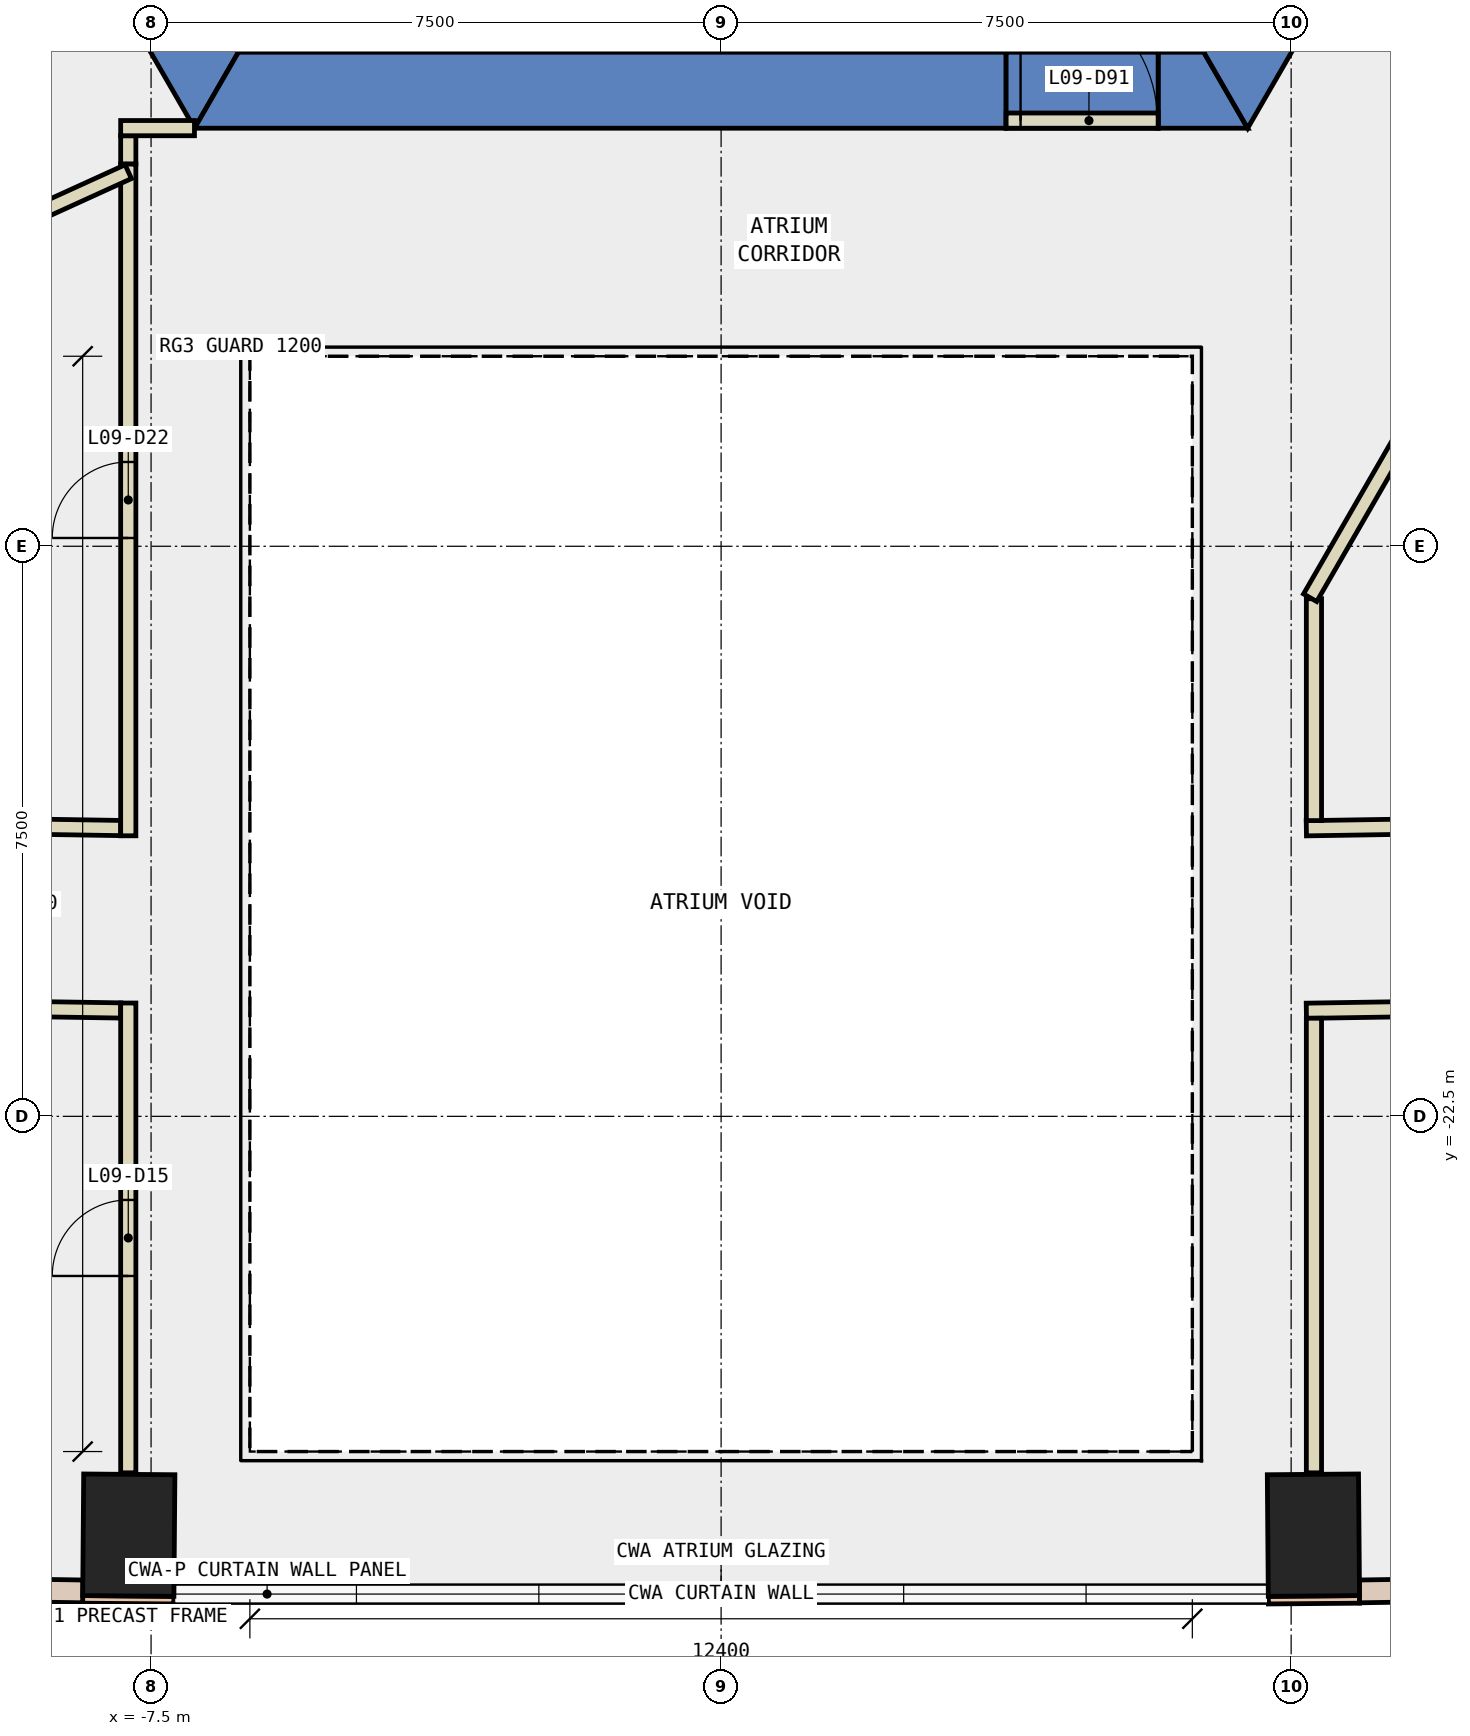
"""IFC4 building model, lengths in metres.
Left out: names, types, materials, properties, quantities, classifications, styles, units other than length and angle.
Written with IfcOpenShell. Run it as: python <this file> out.ifc"""

import sys

from ifc_helpers import new_model, si_unit, direction, frame, frame_2d, origin, origin_2d, place, context, subcontext, project, spatial, polyline, rectangle, outline, extrude, element, fill, save


model = new_model("IFC4")
c1 = context("Model", 3, precision=1e-05, world=origin(), true_north=direction((0.0, 1.0)))
c2 = subcontext(c1, "Body", "Model", "MODEL_VIEW")
j1 = project(units=[si_unit("LENGTHUNIT", "METRE"), si_unit("PLANEANGLEUNIT", "RADIAN")], contexts=[c1])
p1 = place(None, origin())
s1 = spatial("IfcSite", under=j1, at=p1, CompositionType="ELEMENT")
p2 = place(p1, origin())
s2 = spatial("IfcBuilding", under=s1, at=p2, CompositionType="ELEMENT")
p3 = place(p2, frame((0.0, 0.0, 47.6)))
s3 = spatial("IfcBuildingStorey", under=s2, at=p3, CompositionType="ELEMENT", Elevation=47.6)
for number, where, z_axis, x_axis in (
    (1, (-7.793, -28.01, -0.4), (0.0, 0.0, 1.0), (-1.0, 0.008, 0.0)),
    (2, (7.793, -28.01, -0.4), (0.0, 0.0, 1.0), (1.0, 0.008, 0.0)),
):
    element("IfcColumn", number, at=place(p3, frame(where, z_axis=z_axis, x_axis=x_axis)), inside=s3, PredefinedType="COLUMN", context=c2, shape_type="SweptSolid", body=[
        extrude(rectangle(XDim=1.2, YDim=1.6, at=origin_2d()), origin(), (0.0, 0.0, 1.0), 4.2),
    ])
p4 = place(p3, frame((0.0, 0.0, -0.4)))
e3 = element("IfcWall", 3, at=p4, inside=s3, PredefinedType="SHEAR", context=c2, shape_type="SweptSolid", body=[
    extrude(outline(polyline([(-13.856, 2.5), (-6.928, -9.5), (-6.351, -8.5), (-12.702, 2.5), (-13.856, 2.5)])), origin(), (0.0, 0.0, 1.0), 4.2),
])
p5 = place(p3, frame((0.0, 0.0, -0.4)))
e4 = element("IfcWall", 4, at=p5, inside=s3, PredefinedType="SHEAR", context=c2, shape_type="SweptSolid", body=[
    extrude(outline(polyline([(3.75, -9.5), (3.75, -8.5), (-6.351, -8.5), (-6.928, -9.5), (3.75, -9.5)])), origin(), (0.0, 0.0, 1.0), 4.2),
])
p6 = place(p3, frame((0.0, 0.0, -0.4)))
e5 = element("IfcWall", 5, at=p6, inside=s3, PredefinedType="SHEAR", context=c2, shape_type="SweptSolid", body=[
    extrude(outline(polyline([(5.75, -8.5), (5.75, -9.5), (6.928, -9.5), (6.351, -8.5), (5.75, -8.5)])), origin(), (0.0, 0.0, 1.0), 4.2),
])
p7 = place(p3, frame((0.0, 0.0, 3.6)))
e6 = element("IfcWall", 6, at=p7, inside=s3, PredefinedType="SHEAR", context=c2, shape_type="SweptSolid", body=[
    extrude(outline(polyline([(5.75, -9.5), (5.75, -8.5), (3.75, -8.5), (3.75, -9.5), (5.75, -9.5)])), origin(), (0.0, 0.0, 1.0), 0.2),
])
p8 = place(p3, frame((0.0, 0.0, -0.4)))
e7 = element("IfcWall", 7, at=p8, inside=s3, PredefinedType="SHEAR", context=c2, shape_type="SweptSolid", body=[
    extrude(outline(polyline([(8.117, -7.44), (7.252, -6.94), (6.351, -8.5), (6.928, -9.5), (8.117, -7.44)])), origin(), (0.0, 0.0, 1.0), 4.2),
])
for number, where, z_axis, x_axis in (
    (8, (-8.4, -28.855, 0.0), (0.0, 0.0, 1.0), (1.0, -0.008, 0.0)),
    (9, (7.2, -28.865, 0.0), (0.0, 0.0, 1.0), (1.0, 0.008, 0.0)),
):
    element("IfcWall", number, at=place(p3, frame(where, z_axis=z_axis, x_axis=x_axis)), inside=s3, PredefinedType="STANDARD", context=c2, shape_type="SweptSolid", body=[
        extrude(rectangle(XDim=1.2, YDim=0.1, at=frame_2d((0.6, 0.0))), origin(), (0.0, 0.0, 1.0), 3.8),
    ])
p9 = place(p3, frame((-15.568, -28.637, 0.0), z_axis=(0.0, 0.0, 1.0), x_axis=(0.999875756772, -0.015762963512, 0.0)))
e10 = element("IfcWall", 10, at=p9, inside=s3, PredefinedType="STANDARD", context=c2, shape_type="SweptSolid", body=[
    extrude(rectangle(XDim=7.171, YDim=0.3, at=frame_2d((3.585, 0.0))), origin(), (0.0, 0.0, 1.0), 3.8),
])
p10 = place(p9, frame((0.593, 0.0, 0.9)))
e11 = element("IfcOpeningElement", 11, at=p10, cuts=e10, PredefinedType="OPENING", context=c2, shape_type="SweptSolid", body=[
    extrude(rectangle(XDim=2.4, YDim=2.6, at=frame_2d((1.2, 1.3))), frame((0.0, 0.16, 0.0), z_axis=(0.0, -1.0, 0.0), x_axis=(1.0, 0.0, 0.0)), (0.0, 0.0, 1.0), 0.32),
])
p11 = place(p9, frame((4.178, 0.0, 0.9)))
e12 = element("IfcOpeningElement", 12, at=p11, cuts=e10, PredefinedType="OPENING", context=c2, shape_type="SweptSolid", body=[
    extrude(rectangle(XDim=2.4, YDim=2.6, at=frame_2d((1.2, 1.3))), frame((0.0, 0.16, 0.0), z_axis=(0.0, -1.0, 0.0), x_axis=(1.0, 0.0, 0.0)), (0.0, 0.0, 1.0), 0.32),
])
p12 = place(p3, frame((8.398, -28.75, 0.0), z_axis=(0.0, 0.0, 1.0), x_axis=(0.999875756772, 0.015762963512, 0.0)))
e13 = element("IfcWall", 13, at=p12, inside=s3, PredefinedType="STANDARD", context=c2, shape_type="SweptSolid", body=[
    extrude(rectangle(XDim=7.171, YDim=0.3, at=frame_2d((3.585, 0.0))), origin(), (0.0, 0.0, 1.0), 3.8),
])
p13 = place(p12, frame((0.593, 0.0, 0.9)))
e14 = element("IfcOpeningElement", 14, at=p13, cuts=e13, PredefinedType="OPENING", context=c2, shape_type="SweptSolid", body=[
    extrude(rectangle(XDim=2.4, YDim=2.6, at=frame_2d((1.2, 1.3))), frame((0.0, 0.16, 0.0), z_axis=(0.0, -1.0, 0.0), x_axis=(1.0, 0.0, 0.0)), (0.0, 0.0, 1.0), 0.32),
])
p14 = place(p12, frame((4.178, 0.0, 0.9)))
e15 = element("IfcOpeningElement", 15, at=p14, cuts=e13, PredefinedType="OPENING", context=c2, shape_type="SweptSolid", body=[
    extrude(rectangle(XDim=2.4, YDim=2.6, at=frame_2d((1.2, 1.3))), frame((0.0, 0.16, 0.0), z_axis=(0.0, -1.0, 0.0), x_axis=(1.0, 0.0, 0.0)), (0.0, 0.0, 1.0), 0.32),
])
p15 = place(p3, frame((7.7, -18.71, 0.0), z_axis=(0.0, 0.0, 1.0), x_axis=(0.999874256061, 0.015857870791, 0.0)))
e16 = element("IfcWall", 16, at=p15, inside=s3, PredefinedType="PARTITIONING", context=c2, shape_type="SweptSolid", body=[
    extrude(rectangle(XDim=8.252, YDim=0.2, at=frame_2d((4.126, 0.0))), origin(), (0.0, 0.0, 1.0), 3.8),
])
p16 = place(p3, frame((-11.477, -18.65, 0.0), z_axis=(0.0, 0.0, 1.0), x_axis=(0.9998724957, -0.015968479661, 0.0)))
e17 = element("IfcWall", 17, at=p16, inside=s3, PredefinedType="PARTITIONING", context=c2, shape_type="SweptSolid", body=[
    extrude(rectangle(XDim=3.578, YDim=0.2, at=frame_2d((1.789, 0.0))), origin(), (0.0, 0.0, 1.0), 3.8),
])
p17 = place(p3, frame((16.078, -20.978, 0.0), z_axis=(0.0, 0.0, 1.0), x_axis=(-0.999873907997, -0.015879801838, 0.0)))
e18 = element("IfcWall", 18, at=p17, inside=s3, PredefinedType="PARTITIONING", context=c2, shape_type="SweptSolid", body=[
    extrude(rectangle(XDim=8.379, YDim=0.2, at=frame_2d((4.189, 0.0))), origin(), (0.0, 0.0, 1.0), 3.8),
])
p18 = place(p17, frame((3.689, 0.0, 0.0)))
e19 = element("IfcOpeningElement", 19, at=p18, cuts=e18, PredefinedType="OPENING", context=c2, shape_type="SweptSolid", body=[
    extrude(rectangle(XDim=1.0, YDim=2.1, at=frame_2d((0.5, 1.05))), frame((0.0, 0.11, 0.0), z_axis=(0.0, -1.0, 0.0), x_axis=(1.0, 0.0, 0.0)), (0.0, 0.0, 1.0), 0.22),
])
p19 = place(p3, frame((-7.9, -21.107, 0.0), z_axis=(0.0, 0.0, 1.0), x_axis=(-0.999876676102, 0.015704540367, 0.0)))
e20 = element("IfcWall", 20, at=p19, inside=s3, PredefinedType="PARTITIONING", context=c2, shape_type="SweptSolid", body=[
    extrude(rectangle(XDim=3.886, YDim=0.2, at=frame_2d((1.943, 0.0))), origin(), (0.0, 0.0, 1.0), 3.8),
])
p20 = place(p3, frame((7.8, -15.69, 0.0), z_axis=(0.0, 0.0, 1.0), x_axis=(0.0, -1.0, 0.0)))
e21 = element("IfcWall", 21, at=p20, inside=s3, PredefinedType="PARTITIONING", context=c2, shape_type="SweptSolid", body=[
    extrude(rectangle(XDim=2.919, YDim=0.2, at=frame_2d((1.459, 0.0))), origin(), (0.0, 0.0, 1.0), 3.8),
])
p21 = place(p3, frame((-7.8, -9.972, 0.0), z_axis=(0.0, 0.0, 1.0), x_axis=(0.0, 1.0, 0.0)))
e22 = element("IfcWall", 22, at=p21, inside=s3, PredefinedType="PARTITIONING", context=c2, shape_type="SweptSolid", body=[
    extrude(rectangle(XDim=0.373, YDim=0.2, at=frame_2d((0.187, 0.0))), origin(), (0.0, 0.0, 1.0), 3.8),
])
p22 = place(p3, frame((-7.9, -9.499, 0.0), z_axis=(0.0, 0.0, 1.0), x_axis=(1.0, 0.0, 0.0)))
e23 = element("IfcWall", 23, at=p22, inside=s3, PredefinedType="PARTITIONING", context=c2, shape_type="SweptSolid", body=[
    extrude(rectangle(XDim=0.971, YDim=0.2, at=frame_2d((0.485, 0.0))), origin(), (0.0, 0.0, 1.0), 3.8),
])
p23 = place(p3, frame((-7.8, -18.809, 0.0), z_axis=(0.0, 0.0, 1.0), x_axis=(0.0, 1.0, 0.0)))
e24 = element("IfcWall", 24, at=p23, inside=s3, PredefinedType="PARTITIONING", context=c2, shape_type="SweptSolid", body=[
    extrude(rectangle(XDim=8.837, YDim=0.2, at=frame_2d((4.418, 0.0))), origin(), (0.0, 0.0, 1.0), 3.8),
])
p24 = place(p23, frame((3.918, 0.0, 0.0)))
e25 = element("IfcOpeningElement", 25, at=p24, cuts=e24, PredefinedType="OPENING", context=c2, shape_type="SweptSolid", body=[
    extrude(rectangle(XDim=1.0, YDim=2.1, at=frame_2d((0.5, 1.05))), frame((0.0, 0.11, 0.0), z_axis=(0.0, -1.0, 0.0), x_axis=(1.0, 0.0, 0.0)), (0.0, 0.0, 1.0), 0.22),
])
p25 = place(p3, frame((7.8, -21.209, 0.0), z_axis=(0.0, 0.0, 1.0), x_axis=(0.0, -1.0, 0.0)))
e26 = element("IfcWall", 26, at=p25, inside=s3, PredefinedType="PARTITIONING", context=c2, shape_type="SweptSolid", body=[
    extrude(rectangle(XDim=5.981, YDim=0.2, at=frame_2d((2.99, 0.0))), origin(), (0.0, 0.0, 1.0), 3.8),
])
p26 = place(p3, frame((-7.8, -27.19, 0.0), z_axis=(0.0, 0.0, 1.0), x_axis=(0.0, 1.0, 0.0)))
e27 = element("IfcWall", 27, at=p26, inside=s3, PredefinedType="PARTITIONING", context=c2, shape_type="SweptSolid", body=[
    extrude(rectangle(XDim=6.181, YDim=0.2, at=frame_2d((3.09, 0.0))), origin(), (0.0, 0.0, 1.0), 3.8),
])
p27 = place(p26, frame((2.59, 0.0, 0.0)))
e28 = element("IfcOpeningElement", 28, at=p27, cuts=e27, PredefinedType="OPENING", context=c2, shape_type="SweptSolid", body=[
    extrude(rectangle(XDim=1.0, YDim=2.1, at=frame_2d((0.5, 1.05))), frame((0.0, 0.11, 0.0), z_axis=(0.0, -1.0, 0.0), x_axis=(1.0, 0.0, 0.0)), (0.0, 0.0, 1.0), 0.22),
])
p28 = place(p3, frame((-7.8, -10.072, 0.0), z_axis=(0.0, 0.0, 1.0), x_axis=(-0.910011899741, -0.414582129777, 0.0)))
e29 = element("IfcWall", 29, at=p28, inside=s3, PredefinedType="PARTITIONING", context=c2, shape_type="SweptSolid", body=[
    extrude(rectangle(XDim=7.694, YDim=0.2, at=frame_2d((3.847, 0.0))), origin(), (0.0, 0.0, 1.0), 3.8),
])
p29 = place(p3, frame((3.75, -9.4, 0.0), z_axis=(0.0, 0.0, 1.0), x_axis=(1.0, 0.0, 0.0)))
e30 = element("IfcWall", 30, at=p29, inside=s3, PredefinedType="PARTITIONING", context=c2, shape_type="SweptSolid", body=[
    extrude(rectangle(XDim=2.0, YDim=0.2, at=frame_2d((1.0, 0.0))), origin(), (0.0, 0.0, 1.0), 2.4),
])
p30 = place(p29, frame((0.19, 0.0, 0.0)))
e31 = element("IfcOpeningElement", 31, at=p30, cuts=e30, PredefinedType="OPENING", context=c2, shape_type="SweptSolid", body=[
    extrude(rectangle(XDim=1.8, YDim=2.1, at=frame_2d((0.9, 1.05))), frame((0.0, 0.11, 0.0), z_axis=(0.0, -1.0, 0.0), x_axis=(1.0, 0.0, 0.0)), (0.0, 0.0, 1.0), 0.22),
])
p31 = place(p3, frame((12.401, -7.621, 0.0), z_axis=(0.0, 0.0, 1.0), x_axis=(-0.499983724212, -0.866034800411, 0.0)))
e32 = element("IfcWall", 32, at=p31, inside=s3, PredefinedType="PARTITIONING", context=c2, shape_type="SweptSolid", body=[
    extrude(rectangle(XDim=9.302, YDim=0.2, at=frame_2d((4.651, 0.0))), origin(), (0.0, 0.0, 1.0), 3.8),
])
p32 = place(p27, origin())
e33 = element("IfcDoor", 33, at=p32, inside=s3, OperationType="SINGLE_SWING_LEFT", PredefinedType="DOOR", context=c2, shape_type="SweptSolid", body=[
    extrude(rectangle(XDim=1.0, YDim=2.1, at=frame_2d((0.5, 1.05))), frame((0.0, 0.025, 0.0), z_axis=(0.0, -1.0, 0.0), x_axis=(1.0, 0.0, 0.0)), (0.0, 0.0, 1.0), 0.05),
])
fill(e28, e33)
p33 = place(p24, origin())
e34 = element("IfcDoor", 34, at=p33, inside=s3, OperationType="SINGLE_SWING_RIGHT", PredefinedType="DOOR", context=c2, shape_type="SweptSolid", body=[
    extrude(rectangle(XDim=1.0, YDim=2.1, at=frame_2d((0.5, 1.05))), frame((0.0, 0.025, 0.0), z_axis=(0.0, -1.0, 0.0), x_axis=(1.0, 0.0, 0.0)), (0.0, 0.0, 1.0), 0.05),
])
fill(e25, e34)
p34 = place(p30, origin())
e35 = element("IfcDoor", 35, at=p34, inside=s3, OperationType="DOUBLE_DOOR_SINGLE_SWING", PredefinedType="DOOR", context=c2, shape_type="SweptSolid", body=[
    extrude(rectangle(XDim=1.8, YDim=2.1, at=frame_2d((0.9, 1.05))), frame((0.0, 0.025, 0.0), z_axis=(0.0, -1.0, 0.0), x_axis=(1.0, 0.0, 0.0)), (0.0, 0.0, 1.0), 0.05),
])
fill(e31, e35)
save(model, sys.argv[1])
